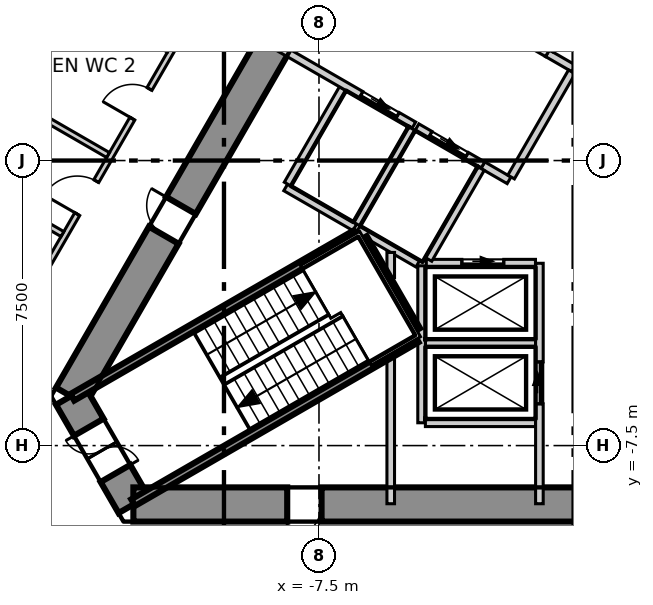
"""IFC4 building model, lengths in metres.
Left out: names, types, materials, properties, quantities, classifications, styles, units other than length and angle.
Written with IfcOpenShell. Run it as: python <this file> out.ifc"""

import sys

from ifc_helpers import new_model, si_unit, direction, frame, frame_2d, origin, place, context, subcontext, project, spatial, polyline, rectangle, outline, extrude, element, fill, save


model = new_model("IFC4")
c1 = context("Model", 3, precision=1e-05, world=origin(), true_north=direction((0.0, 1.0)))
c2 = subcontext(c1, "Body", "Model", "MODEL_VIEW")
j1 = project(units=[si_unit("LENGTHUNIT", "METRE"), si_unit("PLANEANGLEUNIT", "RADIAN")], contexts=[c1])
p1 = place(None, origin())
s1 = spatial("IfcSite", under=j1, at=p1, CompositionType="ELEMENT")
p2 = place(p1, origin())
s2 = spatial("IfcBuilding", under=s1, at=p2, CompositionType="ELEMENT")
p3 = place(p2, frame((0.0, 0.0, 83.3)))
s3 = spatial("IfcBuildingStorey", under=s2, at=p3, CompositionType="ELEMENT", Elevation=83.3)
p4 = place(p3, frame((-1.645, 15.25, -0.3), z_axis=(0.0, 0.0, 1.0), x_axis=(-0.500026485275, -0.866010111964, 0.0)))
e1 = element("IfcWall", 1, at=p4, inside=s3, PredefinedType="SHEAR", context=c2, shape_type="SweptSolid", body=[
    extrude(outline(polyline([(-0.26, -0.45), (1.685, -0.45), (3.63, -0.45), (5.576, -0.45), (7.521, -0.45), (9.466, -0.449), (11.411, -0.449), (13.357, -0.449), (15.302, -0.449), (17.247, -0.449), (19.192, -0.449), (21.138, -0.449), (23.083, -0.449), (25.028, -0.449), (24.509, 0.45), (22.644, 0.45), (20.778, 0.45), (18.913, 0.45), (17.048, 0.45), (15.182, 0.449), (13.317, 0.449), (11.452, 0.449), (9.587, 0.449), (7.721, 0.449), (5.856, 0.449), (3.991, 0.449), (2.125, 0.449), (0.26, 0.449), (-0.26, -0.45)])), origin(), (0.0, 0.0, 1.0), 4.0),
])
p5 = place(p4, frame((11.834, 0.0, 0.3)))
e2 = element("IfcOpeningElement", 2, at=p5, cuts=e1, PredefinedType="OPENING", context=c2, shape_type="SweptSolid", body=[
    extrude(rectangle(XDim=1.1, YDim=2.1, at=frame_2d((0.55, 1.05))), frame((0.0, 0.46, 0.0), z_axis=(0.0, -1.0, 0.0), x_axis=(1.0, 0.0, 0.0)), (0.0, 0.0, 1.0), 0.92),
])
p6 = place(p4, frame((18.976, 0.0, 0.3)))
e3 = element("IfcOpeningElement", 3, at=p6, cuts=e1, PredefinedType="OPENING", context=c2, shape_type="SweptSolid", body=[
    extrude(rectangle(XDim=0.9, YDim=2.1, at=frame_2d((0.45, 1.05))), frame((0.0, 0.46, 0.0), z_axis=(0.0, -1.0, 0.0), x_axis=(1.0, 0.0, 0.0)), (0.0, 0.0, 1.0), 0.92),
])
p7 = place(p3, frame((-14.03, -6.2, -0.3), z_axis=(0.0, 0.0, 1.0), x_axis=(0.500111984565, -0.865960739811, 0.0)))
e4 = element("IfcWall", 4, at=p7, inside=s3, PredefinedType="SHEAR", context=c2, shape_type="SweptSolid", body=[
    extrude(outline(polyline([(-0.26, -0.449), (1.646, -0.449), (3.551, -0.45), (3.032, 0.45), (1.646, 0.45), (0.26, 0.45), (-0.26, -0.449)])), origin(), (0.0, 0.0, 1.0), 4.0),
])
p8 = place(p7, frame((0.946, 0.0, 0.3)))
e5 = element("IfcOpeningElement", 5, at=p8, cuts=e4, PredefinedType="OPENING", context=c2, shape_type="SweptSolid", body=[
    extrude(rectangle(XDim=1.4, YDim=2.1, at=frame_2d((0.7, 1.05))), frame((0.0, 0.46, 0.0), z_axis=(0.0, -1.0, 0.0), x_axis=(1.0, 0.0, 0.0)), (0.0, 0.0, 1.0), 0.92),
])
p9 = place(p3, frame((-12.384, -9.05, -0.3), z_axis=(0.0, 0.0, 1.0), x_axis=(1.0, 0.0, 0.0)))
e6 = element("IfcWall", 6, at=p9, inside=s3, PredefinedType="SHEAR", context=c2, shape_type="SweptSolid", body=[
    extrude(outline(polyline([(-0.26, -0.45), (1.685, -0.45), (3.63, -0.45), (5.576, -0.45), (7.521, -0.45), (9.466, -0.45), (11.411, -0.45), (13.357, -0.45), (15.302, -0.45), (17.247, -0.45), (19.192, -0.45), (21.138, -0.45), (23.083, -0.45), (25.028, -0.45), (24.508, 0.45), (22.643, 0.45), (20.778, 0.45), (18.912, 0.45), (17.047, 0.45), (15.182, 0.45), (13.317, 0.45), (11.451, 0.45), (9.586, 0.45), (7.721, 0.45), (5.856, 0.45), (3.99, 0.45), (2.125, 0.45), (0.26, 0.45), (-0.26, -0.45)])), origin(), (0.0, 0.0, 1.0), 4.0),
])
p10 = place(p9, frame((4.05, 0.0, 0.3)))
e7 = element("IfcOpeningElement", 7, at=p10, cuts=e6, PredefinedType="OPENING", context=c2, shape_type="SweptSolid", body=[
    extrude(rectangle(XDim=0.9, YDim=2.1, at=frame_2d((0.45, 1.05))), frame((0.0, 0.46, 0.0), z_axis=(0.0, -1.0, 0.0), x_axis=(1.0, 0.0, 0.0)), (0.0, 0.0, 1.0), 0.92),
])
p11 = place(p9, frame((15.32, 0.0, 0.3)))
e8 = element("IfcOpeningElement", 8, at=p11, cuts=e6, PredefinedType="OPENING", context=c2, shape_type="SweptSolid", body=[
    extrude(rectangle(XDim=0.9, YDim=2.1, at=frame_2d((0.45, 1.05))), frame((0.0, 0.46, 0.0), z_axis=(0.0, -1.0, 0.0), x_axis=(1.0, 0.0, 0.0)), (0.0, 0.0, 1.0), 0.92),
])
p12 = place(p3, frame((-3.28, 36.577, 0.0), z_axis=(0.0, 0.0, 1.0), x_axis=(-0.500001635065, -0.866024459777, 0.0)))
e9 = element("IfcWall", 9, at=p12, inside=s3, PredefinedType="ELEMENTEDWALL", context=c2, shape_type="SweptSolid", body=[
    extrude(rectangle(XDim=60.053, YDim=0.2, at=frame_2d((30.027, 0.0))), origin(), (0.0, 0.0, 1.0), 3.7),
])
p13 = place(p12, frame((2.094, 0.0, 0.9)))
e10 = element("IfcOpeningElement", 10, at=p13, cuts=e9, PredefinedType="OPENING", context=c2, shape_type="SweptSolid", body=[
    extrude(rectangle(XDim=5.6, YDim=2.5, at=frame_2d((2.8, 1.25))), frame((0.0, 0.11, 0.0), z_axis=(0.0, -1.0, 0.0), x_axis=(1.0, 0.0, 0.0)), (0.0, 0.0, 1.0), 0.22),
])
p14 = place(p12, frame((9.278, 0.0, 0.9)))
e11 = element("IfcOpeningElement", 11, at=p14, cuts=e9, PredefinedType="OPENING", context=c2, shape_type="SweptSolid", body=[
    extrude(rectangle(XDim=5.6, YDim=2.5, at=frame_2d((2.8, 1.25))), frame((0.0, 0.11, 0.0), z_axis=(0.0, -1.0, 0.0), x_axis=(1.0, 0.0, 0.0)), (0.0, 0.0, 1.0), 0.22),
])
p15 = place(p12, frame((16.461, 0.0, 0.9)))
e12 = element("IfcOpeningElement", 12, at=p15, cuts=e9, PredefinedType="OPENING", context=c2, shape_type="SweptSolid", body=[
    extrude(rectangle(XDim=5.6, YDim=2.5, at=frame_2d((2.8, 1.25))), frame((0.0, 0.11, 0.0), z_axis=(0.0, -1.0, 0.0), x_axis=(1.0, 0.0, 0.0)), (0.0, 0.0, 1.0), 0.22),
])
p16 = place(p12, frame((23.645, 0.0, 0.9)))
e13 = element("IfcOpeningElement", 13, at=p16, cuts=e9, PredefinedType="OPENING", context=c2, shape_type="SweptSolid", body=[
    extrude(rectangle(XDim=5.6, YDim=2.5, at=frame_2d((2.8, 1.25))), frame((0.0, 0.11, 0.0), z_axis=(0.0, -1.0, 0.0), x_axis=(1.0, 0.0, 0.0)), (0.0, 0.0, 1.0), 0.22),
])
p17 = place(p12, frame((30.828, 0.0, 0.9)))
e14 = element("IfcOpeningElement", 14, at=p17, cuts=e9, PredefinedType="OPENING", context=c2, shape_type="SweptSolid", body=[
    extrude(rectangle(XDim=5.6, YDim=2.5, at=frame_2d((2.8, 1.25))), frame((0.0, 0.11, 0.0), z_axis=(0.0, -1.0, 0.0), x_axis=(1.0, 0.0, 0.0)), (0.0, 0.0, 1.0), 0.22),
])
p18 = place(p12, frame((38.012, 0.0, 0.9)))
e15 = element("IfcOpeningElement", 15, at=p18, cuts=e9, PredefinedType="OPENING", context=c2, shape_type="SweptSolid", body=[
    extrude(rectangle(XDim=5.6, YDim=2.5, at=frame_2d((2.8, 1.25))), frame((0.0, 0.11, 0.0), z_axis=(0.0, -1.0, 0.0), x_axis=(1.0, 0.0, 0.0)), (0.0, 0.0, 1.0), 0.22),
])
p19 = place(p12, frame((45.195, 0.0, 0.9)))
e16 = element("IfcOpeningElement", 16, at=p19, cuts=e9, PredefinedType="OPENING", context=c2, shape_type="SweptSolid", body=[
    extrude(rectangle(XDim=5.6, YDim=2.5, at=frame_2d((2.8, 1.25))), frame((0.0, 0.11, 0.0), z_axis=(0.0, -1.0, 0.0), x_axis=(1.0, 0.0, 0.0)), (0.0, 0.0, 1.0), 0.22),
])
p20 = place(p12, frame((52.379, 0.0, 0.9)))
e17 = element("IfcOpeningElement", 17, at=p20, cuts=e9, PredefinedType="OPENING", context=c2, shape_type="SweptSolid", body=[
    extrude(rectangle(XDim=5.6, YDim=2.5, at=frame_2d((2.8, 1.25))), frame((0.0, 0.11, 0.0), z_axis=(0.0, -1.0, 0.0), x_axis=(1.0, 0.0, 0.0)), (0.0, 0.0, 1.0), 0.22),
])
p21 = place(p3, frame((-19.497, -11.17, 0.0), z_axis=(0.0, 0.0, 1.0), x_axis=(0.499998854553, 0.866026065108, 0.0)))
e18 = element("IfcWall", 18, at=p21, inside=s3, PredefinedType="PARTITIONING", context=c2, shape_type="SweptSolid", body=[
    extrude(rectangle(XDim=38.994, YDim=0.15, at=frame_2d((19.497, 0.0))), origin(), (0.0, 0.0, 1.0), 3.7),
])
p22 = place(p21, frame((35.844, 0.0, 0.0)))
e19 = element("IfcOpeningElement", 19, at=p22, cuts=e18, PredefinedType="OPENING", context=c2, shape_type="SweptSolid", body=[
    extrude(rectangle(XDim=1.1, YDim=2.1, at=frame_2d((0.55, 1.05))), frame((0.0, 0.085, 0.0), z_axis=(0.0, -1.0, 0.0), x_axis=(1.0, 0.0, 0.0)), (0.0, 0.0, 1.0), 0.17),
])
p23 = place(p21, frame((26.04, 0.0, 0.0)))
e20 = element("IfcOpeningElement", 20, at=p23, cuts=e18, PredefinedType="OPENING", context=c2, shape_type="SweptSolid", body=[
    extrude(rectangle(XDim=1.1, YDim=2.1, at=frame_2d((0.55, 1.05))), frame((0.0, 0.085, 0.0), z_axis=(0.0, -1.0, 0.0), x_axis=(1.0, 0.0, 0.0)), (0.0, 0.0, 1.0), 0.17),
])
p24 = place(p21, frame((7.272, 0.0, 0.0)))
e21 = element("IfcOpeningElement", 21, at=p24, cuts=e18, PredefinedType="OPENING", context=c2, shape_type="SweptSolid", body=[
    extrude(rectangle(XDim=1.1, YDim=2.1, at=frame_2d((0.55, 1.05))), frame((0.0, 0.085, 0.0), z_axis=(0.0, -1.0, 0.0), x_axis=(1.0, 0.0, 0.0)), (0.0, 0.0, 1.0), 0.17),
])
p25 = place(p21, frame((17.372, 0.0, 0.0)))
e22 = element("IfcOpeningElement", 22, at=p25, cuts=e18, PredefinedType="OPENING", context=c2, shape_type="SweptSolid", body=[
    extrude(rectangle(XDim=0.9, YDim=2.1, at=frame_2d((0.45, 1.05))), frame((0.0, 0.085, 0.0), z_axis=(0.0, -1.0, 0.0), x_axis=(1.0, 0.0, 0.0)), (0.0, 0.0, 1.0), 0.17),
])
p26 = place(p21, frame((14.172, 0.0, 0.0)))
e23 = element("IfcOpeningElement", 23, at=p26, cuts=e18, PredefinedType="OPENING", context=c2, shape_type="SweptSolid", body=[
    extrude(rectangle(XDim=0.9, YDim=2.1, at=frame_2d((0.45, 1.05))), frame((0.0, 0.085, 0.0), z_axis=(0.0, -1.0, 0.0), x_axis=(1.0, 0.0, 0.0)), (0.0, 0.0, 1.0), 0.17),
])
p27 = place(p21, frame((11.272, 0.0, 0.0)))
e24 = element("IfcOpeningElement", 24, at=p27, cuts=e18, PredefinedType="OPENING", context=c2, shape_type="SweptSolid", body=[
    extrude(rectangle(XDim=1.0, YDim=2.1, at=frame_2d((0.5, 1.05))), frame((0.0, 0.085, 0.0), z_axis=(0.0, -1.0, 0.0), x_axis=(1.0, 0.0, 0.0)), (0.0, 0.0, 1.0), 0.17),
])
p28 = place(p21, frame((1.904, 0.0, 0.0)))
e25 = element("IfcOpeningElement", 25, at=p28, cuts=e18, PredefinedType="OPENING", context=c2, shape_type="SweptSolid", body=[
    extrude(rectangle(XDim=1.1, YDim=2.1, at=frame_2d((0.55, 1.05))), frame((0.0, 0.085, 0.0), z_axis=(0.0, -1.0, 0.0), x_axis=(1.0, 0.0, 0.0)), (0.0, 0.0, 1.0), 0.17),
])
p29 = place(p3, frame((-17.304, -0.171, 0.0), z_axis=(0.0, 0.0, 1.0), x_axis=(0.500054279689, 0.865994063124, 0.0)))
e26 = element("IfcWall", 26, at=p29, inside=s3, PredefinedType="PARTITIONING", context=c2, shape_type="SweptSolid", body=[
    extrude(rectangle(XDim=8.725, YDim=0.15, at=frame_2d((4.363, 0.0))), origin(), (0.0, 0.0, 1.0), 3.7),
])
for number, where, z_axis, x_axis in (
    (27, (-17.239, -0.209, 0.0), (0.0, 0.0, 1.0), (0.866, -0.5, 0.0)),
    (28, (-16.039, 1.87, 0.0), (0.0, 0.0, 1.0), (0.866, -0.5, 0.0)),
):
    element("IfcWall", number, at=place(p3, frame(where, z_axis=z_axis, x_axis=x_axis)), inside=s3, PredefinedType="PARTITIONING", context=c2, shape_type="SweptSolid", body=[
        extrude(rectangle(XDim=3.45, YDim=0.15, at=frame_2d((1.725, 0.0))), origin(), (0.0, 0.0, 1.0), 3.7),
    ])
p30 = place(p3, frame((-8.376, -0.707, 0.0), z_axis=(0.0, 0.0, 1.0), x_axis=(0.866067520717, -0.499927044236, 0.0)))
e29 = element("IfcWall", 29, at=p30, inside=s3, PredefinedType="SOLIDWALL", context=c2, shape_type="SweptSolid", body=[
    extrude(rectangle(XDim=2.1, YDim=0.2, at=frame_2d((1.05, 0.0))), origin(), (0.0, 0.0, 1.0), 3.7),
])
p31 = place(p3, frame((-8.326, -0.62, 0.0), z_axis=(0.0, 0.0, 1.0), x_axis=(0.500023687443, 0.866011727401, 0.0)))
e30 = element("IfcWall", 30, at=p31, inside=s3, PredefinedType="SOLIDWALL", context=c2, shape_type="SweptSolid", body=[
    extrude(rectangle(XDim=2.9, YDim=0.2, at=frame_2d((1.45, 0.0))), origin(), (0.0, 0.0, 1.0), 3.7),
])
p32 = place(p3, frame((-4.7, -4.8, 0.0), z_axis=(0.0, 0.0, 1.0), x_axis=(1.0, 0.0, 0.0)))
e31 = element("IfcWall", 31, at=p32, inside=s3, PredefinedType="SOLIDWALL", context=c2, shape_type="SweptSolid", body=[
    extrude(rectangle(XDim=2.9, YDim=0.2, at=frame_2d((1.45, 0.0))), origin(), (0.0, 0.0, 1.0), 3.7),
])
p33 = place(p3, frame((-4.8, -6.9, 0.0), z_axis=(0.0, 0.0, 1.0), x_axis=(0.0, 1.0, 0.0)))
e32 = element("IfcWall", 32, at=p33, inside=s3, PredefinedType="SOLIDWALL", context=c2, shape_type="SweptSolid", body=[
    extrude(rectangle(XDim=4.131, YDim=0.2, at=frame_2d((2.065, 0.0))), origin(), (0.0, 0.0, 1.0), 3.7),
])
p34 = place(p3, frame((-4.7, -6.9, 0.0), z_axis=(0.0, 0.0, 1.0), x_axis=(1.0, 0.0, 0.0)))
e33 = element("IfcWall", 33, at=p34, inside=s3, PredefinedType="SOLIDWALL", context=c2, shape_type="SweptSolid", body=[
    extrude(rectangle(XDim=2.9, YDim=0.2, at=frame_2d((1.45, 0.0))), origin(), (0.0, 0.0, 1.0), 3.7),
])
p35 = place(p3, frame((-1.7, -9.03, 0.0), z_axis=(0.0, 0.0, 1.0), x_axis=(0.0, 1.0, 0.0)))
e34 = element("IfcWall", 34, at=p35, inside=s3, PredefinedType="SOLIDWALL", context=c2, shape_type="SweptSolid", body=[
    extrude(rectangle(XDim=6.327, YDim=0.2, at=frame_2d((3.164, 0.0))), origin(), (0.0, 0.0, 1.0), 3.7),
])
p36 = place(p35, frame((2.63, 0.0, 0.0)))
e35 = element("IfcOpeningElement", 35, at=p36, cuts=e34, PredefinedType="OPENING", context=c2, shape_type="SweptSolid", body=[
    extrude(rectangle(XDim=1.1, YDim=2.1, at=frame_2d((0.55, 1.05))), frame((0.0, 0.11, 0.0), z_axis=(0.0, -1.0, 0.0), x_axis=(1.0, 0.0, 0.0)), (0.0, 0.0, 1.0), 0.22),
])
p37 = place(p3, frame((-4.676, -2.7, 0.0), z_axis=(0.0, 0.0, 1.0), x_axis=(1.0, 0.0, 0.0)))
e36 = element("IfcWall", 36, at=p37, inside=s3, PredefinedType="SOLIDWALL", context=c2, shape_type="SweptSolid", body=[
    extrude(rectangle(XDim=2.873, YDim=0.2, at=frame_2d((1.437, 0.0))), origin(), (0.0, 0.0, 1.0), 3.7),
])
p38 = place(p37, frame((0.937, 0.0, 0.0)))
e37 = element("IfcOpeningElement", 37, at=p38, cuts=e36, PredefinedType="OPENING", context=c2, shape_type="SweptSolid", body=[
    extrude(rectangle(XDim=1.1, YDim=2.1, at=frame_2d((0.55, 1.05))), frame((0.0, 0.11, 0.0), z_axis=(0.0, -1.0, 0.0), x_axis=(1.0, 0.0, 0.0)), (0.0, 0.0, 1.0), 0.22),
])
p39 = place(p3, frame((-8.67, 3.043, 0.0), z_axis=(0.0, 0.0, 1.0), x_axis=(0.866029956157, -0.499992114976, 0.0)))
e38 = element("IfcWall", 38, at=p39, inside=s3, PredefinedType="SOLIDWALL", context=c2, shape_type="SweptSolid", body=[
    extrude(rectangle(XDim=4.232, YDim=0.2, at=frame_2d((2.116, 0.0))), origin(), (0.0, 0.0, 1.0), 3.7),
])
p40 = place(p39, frame((2.63, 0.0, 0.0)))
e39 = element("IfcOpeningElement", 39, at=p40, cuts=e38, PredefinedType="OPENING", context=c2, shape_type="SweptSolid", body=[
    extrude(rectangle(XDim=1.1, YDim=2.1, at=frame_2d((0.55, 1.05))), frame((0.0, 0.11, 0.0), z_axis=(0.0, -1.0, 0.0), x_axis=(1.0, 0.0, 0.0)), (0.0, 0.0, 1.0), 0.22),
])
p41 = place(p3, frame((-3.188, -0.122, 0.0), z_axis=(0.0, 0.0, 1.0), x_axis=(0.865705793592, -0.50055317294, 0.0)))
e40 = element("IfcWall", 40, at=p41, inside=s3, PredefinedType="SOLIDWALL", context=c2, shape_type="SweptSolid", body=[
    extrude(rectangle(XDim=0.797, YDim=0.2, at=frame_2d((0.398, 0.0))), origin(), (0.0, 0.0, 1.0), 3.7),
])
p42 = place(p3, frame((-1.488, 2.822, 0.0), z_axis=(0.0, 0.0, 1.0), x_axis=(0.866236612152, -0.499633997809, 0.0)))
e41 = element("IfcWall", 41, at=p42, inside=s3, PredefinedType="SOLIDWALL", context=c2, shape_type="SweptSolid", body=[
    extrude(rectangle(XDim=0.796, YDim=0.2, at=frame_2d((0.398, 0.0))), origin(), (0.0, 0.0, 1.0), 3.7),
])
p43 = place(p3, frame((-2.444, -0.433, 0.0), z_axis=(0.0, 0.0, 1.0), x_axis=(0.500035624827, 0.866004834804, 0.0)))
e42 = element("IfcWall", 42, at=p43, inside=s3, PredefinedType="SOLIDWALL", context=c2, shape_type="SweptSolid", body=[
    extrude(rectangle(XDim=3.194, YDim=0.2, at=frame_2d((1.597, 0.0))), origin(), (0.0, 0.0, 1.0), 3.7),
])
p44 = place(p3, frame((-6.507, -1.67, 0.0), z_axis=(0.0, 0.0, 1.0), x_axis=(0.50012328804, 0.865954211699, 0.0)))
e43 = element("IfcWall", 43, at=p44, inside=s3, PredefinedType="SOLIDWALL", context=c2, shape_type="SweptSolid", body=[
    extrude(rectangle(XDim=2.9, YDim=0.2, at=frame_2d((1.45, 0.0))), origin(), (0.0, 0.0, 1.0), 3.7),
])
p45 = place(p3, frame((-6.47, -1.807, 0.0), z_axis=(0.0, 0.0, 1.0), x_axis=(0.865883195159, -0.500246231712, 0.0)))
e44 = element("IfcWall", 44, at=p45, inside=s3, PredefinedType="SOLIDWALL", context=c2, shape_type="SweptSolid", body=[
    extrude(rectangle(XDim=1.815, YDim=0.2, at=frame_2d((0.908, 0.0))), origin(), (0.0, 0.0, 1.0), 3.7),
])
p46 = place(p3, frame((-4.922, 0.879, 0.0), z_axis=(0.0, 0.0, 1.0), x_axis=(0.866073918653, -0.499915960366, 0.0)))
e45 = element("IfcWall", 45, at=p46, inside=s3, PredefinedType="SOLIDWALL", context=c2, shape_type="SweptSolid", body=[
    extrude(rectangle(XDim=2.002, YDim=0.2, at=frame_2d((1.001, 0.0))), origin(), (0.0, 0.0, 1.0), 3.7),
])
p47 = place(p46, frame((0.402, 0.0, 0.0)))
e46 = element("IfcOpeningElement", 46, at=p47, cuts=e45, PredefinedType="OPENING", context=c2, shape_type="SweptSolid", body=[
    extrude(rectangle(XDim=1.1, YDim=2.1, at=frame_2d((0.55, 1.05))), frame((0.0, 0.11, 0.0), z_axis=(0.0, -1.0, 0.0), x_axis=(1.0, 0.0, 0.0)), (0.0, 0.0, 1.0), 0.22),
])
p48 = place(p3, frame((-4.619, -2.6, 0.0), z_axis=(0.0, 0.0, 1.0), x_axis=(0.50009492287, 0.865970593103, 0.0)))
e47 = element("IfcWall", 47, at=p48, inside=s3, PredefinedType="SOLIDWALL", context=c2, shape_type="SweptSolid", body=[
    extrude(rectangle(XDim=2.761, YDim=0.2, at=frame_2d((1.381, 0.0))), origin(), (0.0, 0.0, 1.0), 3.7),
])
p49 = place(p3, frame((-3.309, 3.873, 0.0), z_axis=(0.0, 0.0, 1.0), x_axis=(0.866098583652, -0.499873227325, 0.0)))
e48 = element("IfcWall", 48, at=p49, inside=s3, PredefinedType="SOLIDWALL", context=c2, shape_type="SweptSolid", body=[
    extrude(rectangle(XDim=2.103, YDim=0.2, at=frame_2d((1.051, 0.0))), origin(), (0.0, 0.0, 1.0), 3.7),
])
p50 = place(p49, frame((0.502, 0.0, 0.0)))
e49 = element("IfcOpeningElement", 49, at=p50, cuts=e48, PredefinedType="OPENING", context=c2, shape_type="SweptSolid", body=[
    extrude(rectangle(XDim=1.1, YDim=2.1, at=frame_2d((0.55, 1.05))), frame((0.0, 0.11, 0.0), z_axis=(0.0, -1.0, 0.0), x_axis=(1.0, 0.0, 0.0)), (0.0, 0.0, 1.0), 0.22),
])
p51 = place(p3, frame((-5.612, -9.03, 0.0), z_axis=(0.0, 0.0, 1.0), x_axis=(0.0, 1.0, 0.0)))
e50 = element("IfcWall", 50, at=p51, inside=s3, PredefinedType="SOLIDWALL", context=c2, shape_type="SweptSolid", body=[
    extrude(rectangle(XDim=3.827, YDim=0.2, at=frame_2d((1.914, 0.0))), origin(), (0.0, 0.0, 1.0), 3.7),
])
p52 = place(p3, frame((-5.612, -3.08, 0.0), z_axis=(0.0, 0.0, 1.0), x_axis=(0.0, 1.0, 0.0)))
e51 = element("IfcWall", 51, at=p52, inside=s3, PredefinedType="SOLIDWALL", context=c2, shape_type="SweptSolid", body=[
    extrude(rectangle(XDim=0.662, YDim=0.2, at=frame_2d((0.331, 0.0))), origin(), (0.0, 0.0, 1.0), 3.7),
])
p53 = place(p3, frame((-13.99, -6.229, 0.0), z_axis=(0.0, 0.0, 1.0), x_axis=(0.866060059011, 0.499939970583, 0.0)))
e52 = element("IfcWall", 52, at=p53, inside=s3, PredefinedType="SOLIDWALL", context=c2, shape_type="SweptSolid", body=[
    extrude(rectangle(XDim=8.615, YDim=0.2, at=frame_2d((4.307, 0.0))), origin(), (0.0, 0.0, 1.0), 3.7),
])
p54 = place(p3, frame((-6.329, -2.038, 0.0), z_axis=(0.0, 0.0, 1.0), x_axis=(0.500200581029, -0.865909567298, 0.0)))
e53 = element("IfcWall", 53, at=p54, inside=s3, PredefinedType="SOLIDWALL", context=c2, shape_type="SweptSolid", body=[
    extrude(rectangle(XDim=2.799, YDim=0.2, at=frame_2d((1.399, 0.0))), origin(), (0.0, 0.0, 1.0), 3.7),
])
p55 = place(p3, frame((-12.39, -9.001, 0.0), z_axis=(0.0, 0.0, 1.0), x_axis=(0.866010975815, 0.500024989144, 0.0)))
e54 = element("IfcWall", 54, at=p55, inside=s3, PredefinedType="SOLIDWALL", context=c2, shape_type="SweptSolid", body=[
    extrude(rectangle(XDim=8.615, YDim=0.2, at=frame_2d((4.308, 0.0))), origin(), (0.0, 0.0, 1.0), 3.7),
])
p56 = place(p38, origin())
e55 = element("IfcDoor", 55, at=p56, inside=s3, OperationType="SLIDING_TO_LEFT", PredefinedType="DOOR", context=c2, shape_type="SweptSolid", body=[
    extrude(rectangle(XDim=1.1, YDim=2.1, at=frame_2d((0.55, 1.05))), frame((0.0, 0.025, 0.0), z_axis=(0.0, -1.0, 0.0), x_axis=(1.0, 0.0, 0.0)), (0.0, 0.0, 1.0), 0.05),
])
fill(e37, e55)
p57 = place(p36, origin())
e56 = element("IfcDoor", 56, at=p57, inside=s3, OperationType="SLIDING_TO_LEFT", PredefinedType="DOOR", context=c2, shape_type="SweptSolid", body=[
    extrude(rectangle(XDim=1.1, YDim=2.1, at=frame_2d((0.55, 1.05))), frame((0.0, 0.025, 0.0), z_axis=(0.0, -1.0, 0.0), x_axis=(1.0, 0.0, 0.0)), (0.0, 0.0, 1.0), 0.05),
])
fill(e35, e56)
p58 = place(p47, origin())
e57 = element("IfcDoor", 57, at=p58, inside=s3, OperationType="SLIDING_TO_LEFT", PredefinedType="DOOR", context=c2, shape_type="SweptSolid", body=[
    extrude(rectangle(XDim=1.1, YDim=2.1, at=frame_2d((0.55, 1.05))), frame((0.0, 0.025, 0.0), z_axis=(0.0, -1.0, 0.0), x_axis=(1.0, 0.0, 0.0)), (0.0, 0.0, 1.0), 0.05),
])
fill(e46, e57)
p59 = place(p40, origin())
e58 = element("IfcDoor", 58, at=p59, inside=s3, OperationType="SLIDING_TO_LEFT", PredefinedType="DOOR", context=c2, shape_type="SweptSolid", body=[
    extrude(rectangle(XDim=1.1, YDim=2.1, at=frame_2d((0.55, 1.05))), frame((0.0, 0.025, 0.0), z_axis=(0.0, -1.0, 0.0), x_axis=(1.0, 0.0, 0.0)), (0.0, 0.0, 1.0), 0.05),
])
fill(e39, e58)
p60 = place(p26, origin())
e59 = element("IfcDoor", 59, at=p60, inside=s3, OperationType="SINGLE_SWING_RIGHT", PredefinedType="DOOR", context=c2, shape_type="SweptSolid", body=[
    extrude(rectangle(XDim=0.9, YDim=2.1, at=frame_2d((0.45, 1.05))), frame((0.0, 0.025, 0.0), z_axis=(0.0, -1.0, 0.0), x_axis=(1.0, 0.0, 0.0)), (0.0, 0.0, 1.0), 0.05),
])
fill(e23, e59)
p61 = place(p27, origin())
e60 = element("IfcDoor", 60, at=p61, inside=s3, OperationType="SINGLE_SWING_RIGHT", PredefinedType="DOOR", context=c2, shape_type="SweptSolid", body=[
    extrude(rectangle(XDim=1.0, YDim=2.1, at=frame_2d((0.5, 1.05))), frame((0.0, 0.025, 0.0), z_axis=(0.0, -1.0, 0.0), x_axis=(1.0, 0.0, 0.0)), (0.0, 0.0, 1.0), 0.05),
])
fill(e24, e60)
p62 = place(p8, origin())
e61 = element("IfcDoor", 61, at=p62, inside=s3, OperationType="DOUBLE_DOOR_SINGLE_SWING", PredefinedType="DOOR", context=c2, shape_type="SweptSolid", body=[
    extrude(rectangle(XDim=1.4, YDim=2.1, at=frame_2d((0.7, 1.05))), frame((0.0, 0.025, 0.0), z_axis=(0.0, -1.0, 0.0), x_axis=(1.0, 0.0, 0.0)), (0.0, 0.0, 1.0), 0.05),
])
fill(e5, e61)
p63 = place(p6, origin())
e62 = element("IfcDoor", 62, at=p63, inside=s3, OperationType="SINGLE_SWING_LEFT", PredefinedType="DOOR", context=c2, shape_type="SweptSolid", body=[
    extrude(rectangle(XDim=0.9, YDim=2.1, at=frame_2d((0.45, 1.05))), frame((0.0, 0.025, 0.0), z_axis=(0.0, -1.0, 0.0), x_axis=(1.0, 0.0, 0.0)), (0.0, 0.0, 1.0), 0.05),
])
fill(e3, e62)
p64 = place(p10, origin())
e63 = element("IfcDoor", 63, at=p64, inside=s3, OperationType="SINGLE_SWING_LEFT", PredefinedType="DOOR", context=c2, shape_type="SweptSolid", body=[
    extrude(rectangle(XDim=0.9, YDim=2.1, at=frame_2d((0.45, 1.05))), frame((0.0, 0.025, 0.0), z_axis=(0.0, -1.0, 0.0), x_axis=(1.0, 0.0, 0.0)), (0.0, 0.0, 1.0), 0.05),
])
fill(e7, e63)
save(model, sys.argv[1])
